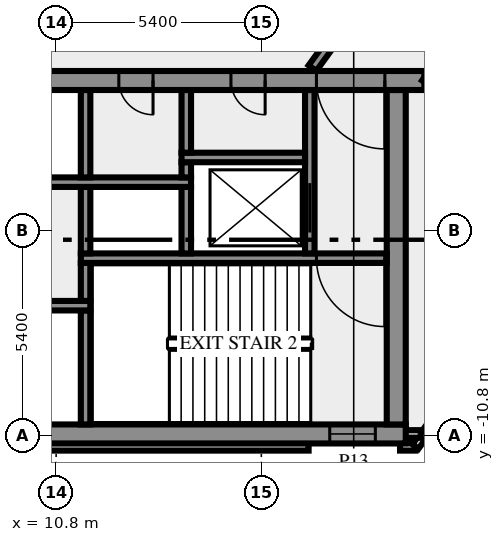
"""IFC4 building model, lengths in metres.
Left out: names, types, materials, properties, quantities, classifications, styles, units other than length and angle.
Written with IfcOpenShell. Run it as: python <this file> out.ifc"""

import sys

from ifc_helpers import new_model, si_unit, direction, frame, frame_2d, origin, place, context, subcontext, project, spatial, rectangle, extrude, element, fill, save


model = new_model("IFC4")
c1 = context("Model", 3, precision=1e-05, world=origin(), true_north=direction((0.0, 1.0)))
c2 = subcontext(c1, "Body", "Model", "MODEL_VIEW")
j1 = project(units=[si_unit("LENGTHUNIT", "METRE"), si_unit("PLANEANGLEUNIT", "RADIAN")], contexts=[c1])
p1 = place(None, origin())
s1 = spatial("IfcSite", under=j1, at=p1, CompositionType="ELEMENT")
p2 = place(p1, origin())
s2 = spatial("IfcBuilding", under=s1, at=p2, CompositionType="ELEMENT")
p3 = place(p2, frame((0.0, 0.0, 97.0)))
s3 = spatial("IfcBuildingStorey", under=s2, at=p3, CompositionType="ELEMENT", Elevation=97.0)
p4 = place(p3, frame((-17.444, -11.088, 0.0), z_axis=(0.0, 0.0, 1.0), x_axis=(1.0, 0.0, 0.0)))
e1 = element("IfcWall", 1, at=p4, inside=s3, PredefinedType="SOLIDWALL", context=c2, shape_type="SweptSolid", body=[
    extrude(rectangle(XDim=34.888, YDim=0.2, at=frame_2d((17.444, 0.0))), origin(), (0.0, 0.0, 1.0), 3.65),
])
p5 = place(p3, frame((19.85, -11.088, 0.0), z_axis=(0.0, 0.0, 1.0), x_axis=(1.0, 0.0, 0.0)))
e2 = element("IfcWall", 2, at=p5, inside=s3, PredefinedType="SOLIDWALL", context=c2, shape_type="SweptSolid", body=[
    extrude(rectangle(XDim=0.406, YDim=0.2, at=frame_2d((0.203, 0.0))), origin(), (0.0, 0.0, 1.0), 3.65),
])
p6 = place(p3, frame((20.253, -11.083, 0.0), z_axis=(0.0, 0.0, 1.0), x_axis=(0.587766567315, 0.809030569476, 0.0)))
e3 = element("IfcWall", 3, at=p6, inside=s3, PredefinedType="SOLIDWALL", context=c2, shape_type="SweptSolid", body=[
    extrude(rectangle(XDim=2.688, YDim=0.2, at=frame_2d((1.344, 0.0))), origin(), (0.0, 0.0, 1.0), 3.65),
])
p7 = place(p3, frame((19.98, -10.75, 0.0), z_axis=(0.0, 0.0, 1.0), x_axis=(1.0, 0.0, 0.0)))
e4 = element("IfcWall", 4, at=p7, inside=s3, PredefinedType="SOLIDWALL", context=c2, shape_type="SweptSolid", body=[
    extrude(rectangle(XDim=0.417, YDim=0.2, at=frame_2d((0.208, 0.0))), origin(), (0.0, 0.0, 1.0), 3.65),
])
p8 = place(p3, frame((-20.0, -10.75, 0.0), z_axis=(0.0, 0.0, 1.0), x_axis=(1.0, 0.0, 0.0)))
e5 = element("IfcWall", 5, at=p8, inside=s3, PredefinedType="SHEAR", context=c2, shape_type="SweptSolid", body=[
    extrude(rectangle(XDim=40.0, YDim=0.5, at=frame_2d((20.0, 0.0))), origin(), (0.0, 0.0, 1.0), 3.65),
])
p9 = place(p8, frame((0.8, 0.0, 1.0)))
e6 = element("IfcOpeningElement", 6, at=p9, cuts=e5, PredefinedType="OPENING", context=c2, shape_type="SweptSolid", body=[
    extrude(rectangle(XDim=1.2, YDim=1.2, at=frame_2d((0.6, 0.6))), frame((0.0, 0.26, 0.0), z_axis=(0.0, -1.0, 0.0), x_axis=(1.0, 0.0, 0.0)), (0.0, 0.0, 1.0), 0.52),
])
p10 = place(p8, frame((38.0, 0.0, 1.0)))
e7 = element("IfcOpeningElement", 7, at=p10, cuts=e5, PredefinedType="OPENING", context=c2, shape_type="SweptSolid", body=[
    extrude(rectangle(XDim=1.2, YDim=1.2, at=frame_2d((0.6, 0.6))), frame((0.0, 0.26, 0.0), z_axis=(0.0, -1.0, 0.0), x_axis=(1.0, 0.0, 0.0)), (0.0, 0.0, 1.0), 0.52),
])
p11 = place(p3, frame((11.575, -10.5, 0.0), z_axis=(0.0, 0.0, 1.0), x_axis=(0.0, 1.0, 0.0)))
e8 = element("IfcWall", 8, at=p11, inside=s3, PredefinedType="SHEAR", context=c2, shape_type="SweptSolid", body=[
    extrude(rectangle(XDim=3.0, YDim=0.25, at=frame_2d((1.5, 0.0))), origin(), (0.0, 0.0, 1.0), 3.65),
])
p12 = place(p3, frame((19.75, -10.5, 0.0), z_axis=(0.0, 0.0, 1.0), x_axis=(0.0, 1.0, 0.0)))
e9 = element("IfcWall", 9, at=p12, inside=s3, PredefinedType="SHEAR", context=c2, shape_type="SweptSolid", body=[
    extrude(rectangle(XDim=8.8, YDim=0.5, at=frame_2d((4.4, 0.0))), origin(), (0.0, 0.0, 1.0), 3.65),
])
p13 = place(p3, frame((11.7, -7.375, 0.0), z_axis=(0.0, 0.0, 1.0), x_axis=(-1.0, 0.0, 0.0)))
e10 = element("IfcWall", 10, at=p13, inside=s3, PredefinedType="SHEAR", context=c2, shape_type="SweptSolid", body=[
    extrude(rectangle(XDim=23.4, YDim=0.25, at=frame_2d((11.7, 0.0))), origin(), (0.0, 0.0, 1.0), 3.65),
])
p14 = place(p13, frame((21.45, 0.0, 0.0)))
e11 = element("IfcOpeningElement", 11, at=p14, cuts=e10, PredefinedType="OPENING", context=c2, shape_type="SweptSolid", body=[
    extrude(rectangle(XDim=1.1, YDim=2.1, at=frame_2d((0.55, 1.05))), frame((0.0, 0.135, 0.0), z_axis=(0.0, -1.0, 0.0), x_axis=(1.0, 0.0, 0.0)), (0.0, 0.0, 1.0), 0.27),
])
p15 = place(p13, frame((18.95, 0.0, 0.0)))
e12 = element("IfcOpeningElement", 12, at=p15, cuts=e10, PredefinedType="OPENING", context=c2, shape_type="SweptSolid", body=[
    extrude(rectangle(XDim=1.1, YDim=2.1, at=frame_2d((0.55, 1.05))), frame((0.0, 0.135, 0.0), z_axis=(0.0, -1.0, 0.0), x_axis=(1.0, 0.0, 0.0)), (0.0, 0.0, 1.0), 0.27),
])
p16 = place(p13, frame((16.45, 0.0, 0.0)))
e13 = element("IfcOpeningElement", 13, at=p16, cuts=e10, PredefinedType="OPENING", context=c2, shape_type="SweptSolid", body=[
    extrude(rectangle(XDim=1.1, YDim=2.1, at=frame_2d((0.55, 1.05))), frame((0.0, 0.135, 0.0), z_axis=(0.0, -1.0, 0.0), x_axis=(1.0, 0.0, 0.0)), (0.0, 0.0, 1.0), 0.27),
])
p17 = place(p13, frame((14.65, 0.0, 0.0)))
e14 = element("IfcOpeningElement", 14, at=p17, cuts=e10, PredefinedType="OPENING", context=c2, shape_type="SweptSolid", body=[
    extrude(rectangle(XDim=0.8, YDim=2.1, at=frame_2d((0.4, 1.05))), frame((0.0, 0.135, 0.0), z_axis=(0.0, -1.0, 0.0), x_axis=(1.0, 0.0, 0.0)), (0.0, 0.0, 1.0), 0.27),
])
p18 = place(p13, frame((12.8, 0.0, 0.0)))
e15 = element("IfcOpeningElement", 15, at=p18, cuts=e10, PredefinedType="OPENING", context=c2, shape_type="SweptSolid", body=[
    extrude(rectangle(XDim=0.9, YDim=2.1, at=frame_2d((0.45, 1.05))), frame((0.0, 0.135, 0.0), z_axis=(0.0, -1.0, 0.0), x_axis=(1.0, 0.0, 0.0)), (0.0, 0.0, 1.0), 0.27),
])
p19 = place(p13, frame((10.7, 0.0, 0.0)))
e16 = element("IfcOpeningElement", 16, at=p19, cuts=e10, PredefinedType="OPENING", context=c2, shape_type="SweptSolid", body=[
    extrude(rectangle(XDim=0.9, YDim=2.1, at=frame_2d((0.45, 1.05))), frame((0.0, 0.135, 0.0), z_axis=(0.0, -1.0, 0.0), x_axis=(1.0, 0.0, 0.0)), (0.0, 0.0, 1.0), 0.27),
])
p20 = place(p3, frame((11.575, -7.25, 0.0), z_axis=(0.0, 0.0, 1.0), x_axis=(0.0, 1.0, 0.0)))
e17 = element("IfcWall", 17, at=p20, inside=s3, PredefinedType="SHEAR", context=c2, shape_type="SweptSolid", body=[
    extrude(rectangle(XDim=1.0, YDim=0.25, at=frame_2d((0.5, 0.0))), origin(), (0.0, 0.0, 1.0), 3.65),
])
p21 = place(p3, frame((19.5, -6.125, 0.0), z_axis=(0.0, 0.0, 1.0), x_axis=(-1.0, 0.0, 0.0)))
e18 = element("IfcWall", 18, at=p21, inside=s3, PredefinedType="SHEAR", context=c2, shape_type="SweptSolid", body=[
    extrude(rectangle(XDim=8.05, YDim=0.25, at=frame_2d((4.025, 0.0))), origin(), (0.0, 0.0, 1.0), 3.65),
])
p22 = place(p21, frame((0.05, 0.0, 0.0)))
e19 = element("IfcOpeningElement", 19, at=p22, cuts=e18, PredefinedType="OPENING", context=c2, shape_type="SweptSolid", body=[
    extrude(rectangle(XDim=1.8, YDim=2.1, at=frame_2d((0.9, 1.05))), frame((0.0, 0.135, 0.0), z_axis=(0.0, -1.0, 0.0), x_axis=(1.0, 0.0, 0.0)), (0.0, 0.0, 1.0), 0.27),
])
for number, where, z_axis, x_axis in (
    (20, (11.575, -6.0, 0.0), (0.0, 0.0, 1.0), (0.0, 1.0, 0.0)),
    (21, (14.225, -6.0, 0.0), (0.0, 0.0, 1.0), (0.0, 1.0, 0.0)),
):
    element("IfcWall", number, at=place(p3, frame(where, z_axis=z_axis, x_axis=x_axis)), inside=s3, PredefinedType="SHEAR", context=c2, shape_type="SweptSolid", body=[
        extrude(rectangle(XDim=1.75, YDim=0.25, at=frame_2d((0.875, 0.0))), origin(), (0.0, 0.0, 1.0), 3.65),
    ])
p23 = place(p3, frame((17.475, -6.0, 0.0), z_axis=(0.0, 0.0, 1.0), x_axis=(0.0, 1.0, 0.0)))
e22 = element("IfcWall", 22, at=p23, inside=s3, PredefinedType="SHEAR", context=c2, shape_type="SweptSolid", body=[
    extrude(rectangle(XDim=4.3, YDim=0.25, at=frame_2d((2.15, 0.0))), origin(), (0.0, 0.0, 1.0), 3.65),
])
p24 = place(p23, frame((0.55, 0.0, 0.0)))
e23 = element("IfcOpeningElement", 23, at=p24, cuts=e22, PredefinedType="OPENING", context=c2, shape_type="SweptSolid", body=[
    extrude(rectangle(XDim=1.3, YDim=2.1, at=frame_2d((0.65, 1.05))), frame((0.0, 0.135, 0.0), z_axis=(0.0, -1.0, 0.0), x_axis=(1.0, 0.0, 0.0)), (0.0, 0.0, 1.0), 0.27),
])
p25 = place(p3, frame((1.45, -4.125, 0.0), z_axis=(0.0, 0.0, 1.0), x_axis=(1.0, 0.0, 0.0)))
e24 = element("IfcWall", 24, at=p25, inside=s3, PredefinedType="SHEAR", context=c2, shape_type="SweptSolid", body=[
    extrude(rectangle(XDim=12.9, YDim=0.25, at=frame_2d((6.45, 0.0))), origin(), (0.0, 0.0, 1.0), 3.65),
])
p26 = place(p25, frame((0.7, 0.0, 0.0)))
e25 = element("IfcOpeningElement", 25, at=p26, cuts=e24, PredefinedType="OPENING", context=c2, shape_type="SweptSolid", body=[
    extrude(rectangle(XDim=1.3, YDim=2.1, at=frame_2d((0.65, 1.05))), frame((0.0, 0.135, 0.0), z_axis=(0.0, -1.0, 0.0), x_axis=(1.0, 0.0, 0.0)), (0.0, 0.0, 1.0), 0.27),
])
p27 = place(p3, frame((11.575, -4.0, 0.0), z_axis=(0.0, 0.0, 1.0), x_axis=(0.0, 1.0, 0.0)))
e26 = element("IfcWall", 26, at=p27, inside=s3, PredefinedType="SHEAR", context=c2, shape_type="SweptSolid", body=[
    extrude(rectangle(XDim=2.3, YDim=0.25, at=frame_2d((1.15, 0.0))), origin(), (0.0, 0.0, 1.0), 3.65),
])
p28 = place(p3, frame((14.225, -4.0, 0.0), z_axis=(0.0, 0.0, 1.0), x_axis=(0.0, 1.0, 0.0)))
e27 = element("IfcWall", 27, at=p28, inside=s3, PredefinedType="SHEAR", context=c2, shape_type="SweptSolid", body=[
    extrude(rectangle(XDim=0.4, YDim=0.25, at=frame_2d((0.2, 0.0))), origin(), (0.0, 0.0, 1.0), 3.65),
])
p29 = place(p3, frame((14.1, -3.475, 0.0), z_axis=(0.0, 0.0, 1.0), x_axis=(1.0, 0.0, 0.0)))
e28 = element("IfcWall", 28, at=p29, inside=s3, PredefinedType="SHEAR", context=c2, shape_type="SweptSolid", body=[
    extrude(rectangle(XDim=3.25, YDim=0.25, at=frame_2d((1.625, 0.0))), origin(), (0.0, 0.0, 1.0), 3.65),
])
p30 = place(p3, frame((14.225, -3.35, 0.0), z_axis=(0.0, 0.0, 1.0), x_axis=(0.0, 1.0, 0.0)))
e29 = element("IfcWall", 29, at=p30, inside=s3, PredefinedType="SHEAR", context=c2, shape_type="SweptSolid", body=[
    extrude(rectangle(XDim=1.65, YDim=0.25, at=frame_2d((0.825, 0.0))), origin(), (0.0, 0.0, 1.0), 3.65),
])
p31 = place(p3, frame((20.49, -1.45, 0.0), z_axis=(0.0, 0.0, 1.0), x_axis=(-1.0, 0.0, 0.0)))
e30 = element("IfcWall", 30, at=p31, inside=s3, PredefinedType="SHEAR", context=c2, shape_type="SweptSolid", body=[
    extrude(rectangle(XDim=40.98, YDim=0.5, at=frame_2d((20.49, 0.0))), origin(), (0.0, 0.0, 1.0), 3.65),
])
p32 = place(p31, frame((38.14, 0.0, 0.0)))
e31 = element("IfcOpeningElement", 31, at=p32, cuts=e30, PredefinedType="OPENING", context=c2, shape_type="SweptSolid", body=[
    extrude(rectangle(XDim=1.8, YDim=2.1, at=frame_2d((0.9, 1.05))), frame((0.0, 0.26, 0.0), z_axis=(0.0, -1.0, 0.0), x_axis=(1.0, 0.0, 0.0)), (0.0, 0.0, 1.0), 0.52),
])
p33 = place(p31, frame((36.728, 0.0, 0.0)))
e32 = element("IfcOpeningElement", 32, at=p33, cuts=e30, PredefinedType="OPENING", context=c2, shape_type="SweptSolid", body=[
    extrude(rectangle(XDim=0.8, YDim=2.1, at=frame_2d((0.4, 1.05))), frame((0.0, 0.26, 0.0), z_axis=(0.0, -1.0, 0.0), x_axis=(1.0, 0.0, 0.0)), (0.0, 0.0, 1.0), 0.52),
])
p34 = place(p31, frame((35.153, 0.0, 0.0)))
e33 = element("IfcOpeningElement", 33, at=p34, cuts=e30, PredefinedType="OPENING", context=c2, shape_type="SweptSolid", body=[
    extrude(rectangle(XDim=0.8, YDim=2.1, at=frame_2d((0.4, 1.05))), frame((0.0, 0.26, 0.0), z_axis=(0.0, -1.0, 0.0), x_axis=(1.0, 0.0, 0.0)), (0.0, 0.0, 1.0), 0.52),
])
p35 = place(p31, frame((32.94, 0.0, 0.0)))
e34 = element("IfcOpeningElement", 34, at=p35, cuts=e30, PredefinedType="OPENING", context=c2, shape_type="SweptSolid", body=[
    extrude(rectangle(XDim=0.9, YDim=2.1, at=frame_2d((0.45, 1.05))), frame((0.0, 0.26, 0.0), z_axis=(0.0, -1.0, 0.0), x_axis=(1.0, 0.0, 0.0)), (0.0, 0.0, 1.0), 0.52),
])
p36 = place(p31, frame((19.59, 0.0, 0.0)))
e35 = element("IfcOpeningElement", 35, at=p36, cuts=e30, PredefinedType="OPENING", context=c2, shape_type="SweptSolid", body=[
    extrude(rectangle(XDim=2.0, YDim=2.1, at=frame_2d((1.0, 1.05))), frame((0.0, 0.26, 0.0), z_axis=(0.0, -1.0, 0.0), x_axis=(1.0, 0.0, 0.0)), (0.0, 0.0, 1.0), 0.52),
])
p37 = place(p31, frame((7.14, 0.0, 0.0)))
e36 = element("IfcOpeningElement", 36, at=p37, cuts=e30, PredefinedType="OPENING", context=c2, shape_type="SweptSolid", body=[
    extrude(rectangle(XDim=0.9, YDim=2.1, at=frame_2d((0.45, 1.05))), frame((0.0, 0.26, 0.0), z_axis=(0.0, -1.0, 0.0), x_axis=(1.0, 0.0, 0.0)), (0.0, 0.0, 1.0), 0.52),
])
p38 = place(p31, frame((4.19, 0.0, 0.0)))
e37 = element("IfcOpeningElement", 37, at=p38, cuts=e30, PredefinedType="OPENING", context=c2, shape_type="SweptSolid", body=[
    extrude(rectangle(XDim=0.9, YDim=2.1, at=frame_2d((0.45, 1.05))), frame((0.0, 0.26, 0.0), z_axis=(0.0, -1.0, 0.0), x_axis=(1.0, 0.0, 0.0)), (0.0, 0.0, 1.0), 0.52),
])
p39 = place(p31, frame((1.04, 0.0, 0.0)))
e38 = element("IfcOpeningElement", 38, at=p39, cuts=e30, PredefinedType="OPENING", context=c2, shape_type="SweptSolid", body=[
    extrude(rectangle(XDim=1.8, YDim=2.1, at=frame_2d((0.9, 1.05))), frame((0.0, 0.26, 0.0), z_axis=(0.0, -1.0, 0.0), x_axis=(1.0, 0.0, 0.0)), (0.0, 0.0, 1.0), 0.52),
])
p40 = place(p3, frame((17.545, -1.125, 0.0), z_axis=(0.0, 0.0, 1.0), x_axis=(0.587791430994, 0.80901250525, 0.0)))
e39 = element("IfcWall", 39, at=p40, inside=s3, PredefinedType="SOLIDWALL", context=c2, shape_type="SweptSolid", body=[
    extrude(rectangle(XDim=24.703, YDim=0.25, at=frame_2d((12.352, 0.0))), origin(), (0.0, 0.0, 1.0), 3.65),
])
p41 = place(p40, frame((3.442, 0.0, 0.0)))
e40 = element("IfcOpeningElement", 40, at=p41, cuts=e39, PredefinedType="OPENING", context=c2, shape_type="SweptSolid", body=[
    extrude(rectangle(XDim=1.2, YDim=2.1, at=frame_2d((0.6, 1.05))), frame((0.0, 0.135, 0.0), z_axis=(0.0, -1.0, 0.0), x_axis=(1.0, 0.0, 0.0)), (0.0, 0.0, 1.0), 0.27),
])
p42 = place(p40, frame((23.329, 0.0, 0.0)))
e41 = element("IfcOpeningElement", 41, at=p42, cuts=e39, PredefinedType="OPENING", context=c2, shape_type="SweptSolid", body=[
    extrude(rectangle(XDim=0.9, YDim=2.1, at=frame_2d((0.45, 1.05))), frame((0.0, 0.135, 0.0), z_axis=(0.0, -1.0, 0.0), x_axis=(1.0, 0.0, 0.0)), (0.0, 0.0, 1.0), 0.27),
])
p43 = place(p3, frame((34.062, 17.101, 0.0), z_axis=(0.0, 0.0, 1.0), x_axis=(-0.58778129431, -0.809019870003, 0.0)))
e42 = element("IfcWall", 42, at=p43, inside=s3, PredefinedType="SOLIDWALL", context=c2, shape_type="SweptSolid", body=[
    extrude(rectangle(XDim=23.021, YDim=0.25, at=frame_2d((11.51, 0.0))), origin(), (0.0, 0.0, 1.0), 3.65),
])
p44 = place(p43, frame((5.465, 0.0, 0.0)))
e43 = element("IfcOpeningElement", 43, at=p44, cuts=e42, PredefinedType="OPENING", context=c2, shape_type="SweptSolid", body=[
    extrude(rectangle(XDim=1.8, YDim=2.1, at=frame_2d((0.9, 1.05))), frame((0.0, 0.135, 0.0), z_axis=(0.0, -1.0, 0.0), x_axis=(1.0, 0.0, 0.0)), (0.0, 0.0, 1.0), 0.27),
])
p45 = place(p43, frame((13.205, 0.0, 0.0)))
e44 = element("IfcOpeningElement", 44, at=p45, cuts=e42, PredefinedType="OPENING", context=c2, shape_type="SweptSolid", body=[
    extrude(rectangle(XDim=0.9, YDim=2.1, at=frame_2d((0.45, 1.05))), frame((0.0, 0.135, 0.0), z_axis=(0.0, -1.0, 0.0), x_axis=(1.0, 0.0, 0.0)), (0.0, 0.0, 1.0), 0.27),
])
p46 = place(p10, origin())
e45 = element("IfcWindow", 45, at=p46, inside=s3, PartitioningType="SINGLE_PANEL", PredefinedType="WINDOW", context=c2, shape_type="SweptSolid", body=[
    extrude(rectangle(XDim=1.2, YDim=1.2, at=frame_2d((0.6, 0.6))), frame((0.0, 0.03, 0.0), z_axis=(0.0, -1.0, 0.0), x_axis=(1.0, 0.0, 0.0)), (0.0, 0.0, 1.0), 0.06),
])
fill(e7, e45)
p47 = place(p22, origin())
e46 = element("IfcDoor", 46, at=p47, inside=s3, OperationType="DOUBLE_DOOR_SINGLE_SWING", PredefinedType="DOOR", context=c2, shape_type="SweptSolid", body=[
    extrude(rectangle(XDim=1.8, YDim=2.1, at=frame_2d((0.9, 1.05))), frame((0.0, 0.025, 0.0), z_axis=(0.0, -1.0, 0.0), x_axis=(1.0, 0.0, 0.0)), (0.0, 0.0, 1.0), 0.05),
])
fill(e19, e46)
p48 = place(p24, origin())
e47 = element("IfcDoor", 47, at=p48, inside=s3, OperationType="DOUBLE_DOOR_SLIDING", PredefinedType="DOOR", context=c2, shape_type="SweptSolid", body=[
    extrude(rectangle(XDim=1.3, YDim=2.1, at=frame_2d((0.65, 1.05))), frame((0.0, 0.025, 0.0), z_axis=(0.0, -1.0, 0.0), x_axis=(1.0, 0.0, 0.0)), (0.0, 0.0, 1.0), 0.05),
])
fill(e23, e47)
p49 = place(p37, origin())
e48 = element("IfcDoor", 48, at=p49, inside=s3, OperationType="SINGLE_SWING_LEFT", PredefinedType="DOOR", context=c2, shape_type="SweptSolid", body=[
    extrude(rectangle(XDim=0.9, YDim=2.1, at=frame_2d((0.45, 1.05))), frame((0.0, 0.025, 0.0), z_axis=(0.0, -1.0, 0.0), x_axis=(1.0, 0.0, 0.0)), (0.0, 0.0, 1.0), 0.05),
])
fill(e36, e48)
p50 = place(p38, origin())
e49 = element("IfcDoor", 49, at=p50, inside=s3, OperationType="SINGLE_SWING_LEFT", PredefinedType="DOOR", context=c2, shape_type="SweptSolid", body=[
    extrude(rectangle(XDim=0.9, YDim=2.1, at=frame_2d((0.45, 1.05))), frame((0.0, 0.025, 0.0), z_axis=(0.0, -1.0, 0.0), x_axis=(1.0, 0.0, 0.0)), (0.0, 0.0, 1.0), 0.05),
])
fill(e37, e49)
p51 = place(p39, origin())
e50 = element("IfcDoor", 50, at=p51, inside=s3, OperationType="DOUBLE_DOOR_SINGLE_SWING", PredefinedType="DOOR", context=c2, shape_type="SweptSolid", body=[
    extrude(rectangle(XDim=1.8, YDim=2.1, at=frame_2d((0.9, 1.05))), frame((0.0, 0.025, 0.0), z_axis=(0.0, -1.0, 0.0), x_axis=(1.0, 0.0, 0.0)), (0.0, 0.0, 1.0), 0.05),
])
fill(e38, e50)
save(model, sys.argv[1])
